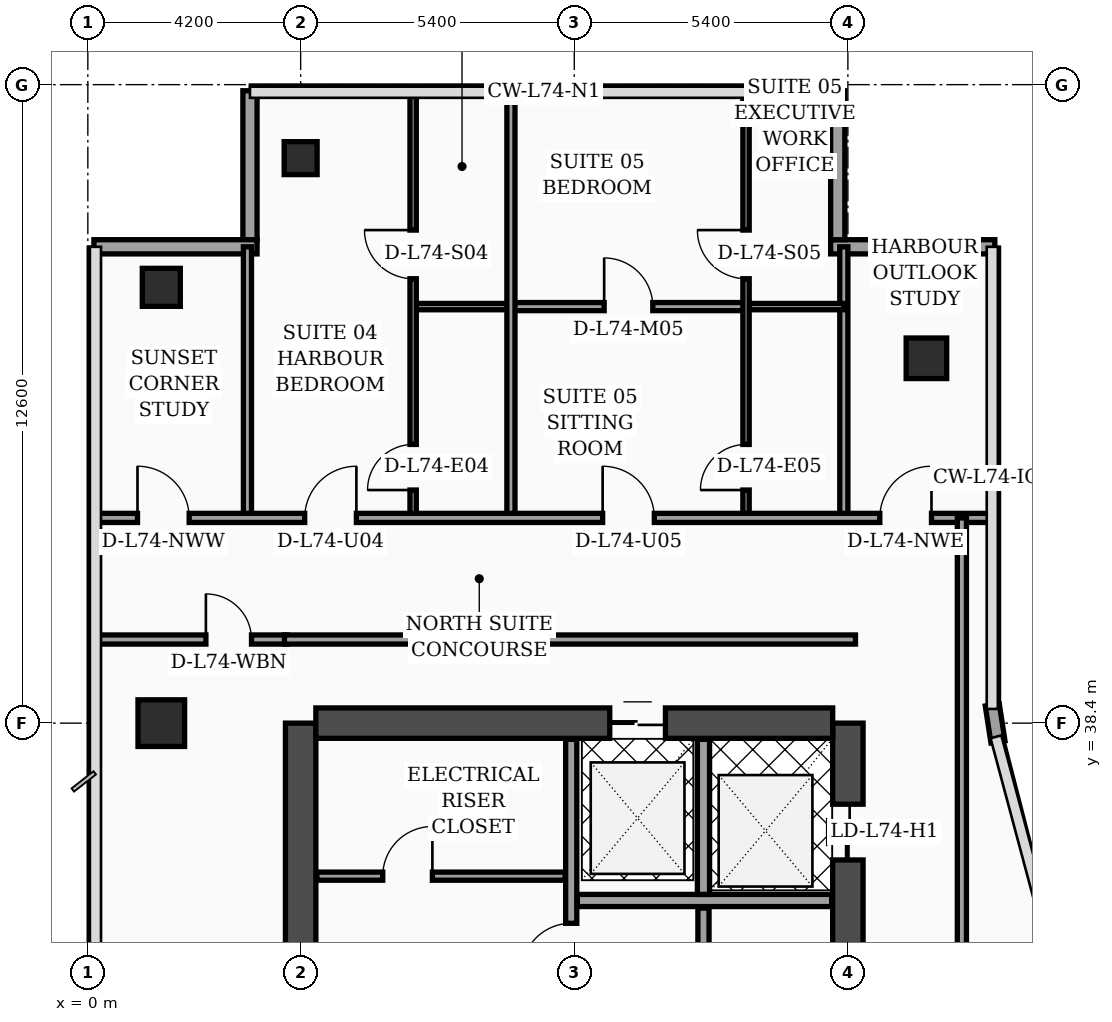
"""IFC4 building model, lengths in metres.
Left out: names, types, materials, properties, quantities, classifications, styles, units other than length and angle.
Written with IfcOpenShell. Run it as: python <this file> out.ifc"""

import sys

from ifc_helpers import new_model, si_unit, direction, frame, frame_2d, origin, origin_2d, place, context, subcontext, project, spatial, rectangle, hollow_rectangle, extrude, element, fill, save


model = new_model("IFC4")
c1 = context("Model", 3, precision=1e-05, world=origin(), true_north=direction((0.0, 1.0)))
c2 = subcontext(c1, "Body", "Model", "MODEL_VIEW")
j1 = project(units=[si_unit("LENGTHUNIT", "METRE"), si_unit("PLANEANGLEUNIT", "RADIAN")], contexts=[c1])
p1 = place(None, origin())
s1 = spatial("IfcSite", under=j1, at=p1, CompositionType="ELEMENT")
p2 = place(p1, origin())
s2 = spatial("IfcBuilding", under=s1, at=p2, CompositionType="ELEMENT")
p3 = place(p2, frame((0.0, 0.0, 298.7)))
s3 = spatial("IfcBuildingStorey", under=s2, at=p3, CompositionType="ELEMENT", Elevation=298.7)
p4 = place(p3, frame((4.2, 16.8, 0.0), z_axis=(0.0, 0.0, 1.0), x_axis=(0.0, 1.0, 0.0)))
e1 = element("IfcWall", 1, at=p4, inside=s3, PredefinedType="SHEAR", context=c2, shape_type="SweptSolid", body=[
    extrude(rectangle(XDim=21.6, YDim=0.6, at=frame_2d((10.8, 0.0))), origin(), (0.0, 0.0, 1.0), 3.56),
])
p5 = place(p3, frame((15.0, 16.8, 0.0), z_axis=(0.0, 0.0, 1.0), x_axis=(0.0, 1.0, 0.0)))
e2 = element("IfcWall", 2, at=p5, inside=s3, PredefinedType="SHEAR", context=c2, shape_type="SweptSolid", body=[
    extrude(rectangle(XDim=21.6, YDim=0.6, at=frame_2d((10.8, 0.0))), origin(), (0.0, 0.0, 1.0), 3.56),
])
p6 = place(p5, frame((8.65, 0.0, 0.0)))
e3 = element("IfcOpeningElement", 3, at=p6, cuts=e2, PredefinedType="OPENING", context=c2, shape_type="SweptSolid", body=[
    extrude(rectangle(XDim=1.1, YDim=2.2, at=frame_2d((0.55, 1.1))), frame((0.0, 0.31, 0.0), z_axis=(0.0, -1.0, 0.0), x_axis=(1.0, 0.0, 0.0)), (0.0, 0.0, 1.0), 0.62),
])
p7 = place(p5, frame((18.9, 0.0, 0.0)))
e4 = element("IfcOpeningElement", 4, at=p7, cuts=e2, PredefinedType="OPENING", context=c2, shape_type="SweptSolid", body=[
    extrude(rectangle(XDim=1.1, YDim=2.2, at=frame_2d((0.55, 1.1))), frame((0.0, 0.31, 0.0), z_axis=(0.0, -1.0, 0.0), x_axis=(1.0, 0.0, 0.0)), (0.0, 0.0, 1.0), 0.62),
])
p8 = place(p3, frame((4.5, 38.4, 0.0), z_axis=(0.0, 0.0, 1.0), x_axis=(1.0, 0.0, 0.0)))
e5 = element("IfcWall", 5, at=p8, inside=s3, PredefinedType="SHEAR", context=c2, shape_type="SweptSolid", body=[
    extrude(rectangle(XDim=10.2, YDim=0.6, at=frame_2d((5.1, 0.0))), origin(), (0.0, 0.0, 1.0), 3.56),
])
p9 = place(p8, frame((5.8, 0.0, 0.0)))
e6 = element("IfcOpeningElement", 6, at=p9, cuts=e5, PredefinedType="OPENING", context=c2, shape_type="SweptSolid", body=[
    extrude(rectangle(XDim=1.1, YDim=2.2, at=frame_2d((0.55, 1.1))), frame((0.0, 0.31, 0.0), z_axis=(0.0, -1.0, 0.0), x_axis=(1.0, 0.0, 0.0)), (0.0, 0.0, 1.0), 0.62),
])
p10 = place(p3, frame((1.45, 38.4, 0.0), z_axis=(0.0, 0.0, 1.0), x_axis=(1.0, 0.0, 0.0)))
e7 = element("IfcColumn", 7, at=p10, inside=s3, PredefinedType="COLUMN", context=c2, shape_type="SweptSolid", body=[
    extrude(rectangle(XDim=0.92, YDim=0.92, at=origin_2d()), origin(), (0.0, 0.0, 1.0), 3.56),
])
p11 = place(p3, frame((1.45, 47.0, 0.0), z_axis=(0.0, 0.0, 1.0), x_axis=(1.0, 0.0, 0.0)))
e8 = element("IfcColumn", 8, at=p11, inside=s3, PredefinedType="COLUMN", context=c2, shape_type="SweptSolid", body=[
    extrude(hollow_rectangle(XDim=0.75, YDim=0.75, WallThickness=0.032, at=origin_2d()), origin(), (0.0, 0.0, 1.0), 3.56),
])
p12 = place(p3, frame((4.2, 49.55, 0.0), z_axis=(0.0, 0.0, 1.0), x_axis=(1.0, 0.0, 0.0)))
e9 = element("IfcColumn", 9, at=p12, inside=s3, PredefinedType="COLUMN", context=c2, shape_type="SweptSolid", body=[
    extrude(hollow_rectangle(XDim=0.65, YDim=0.65, WallThickness=0.028, at=origin_2d()), origin(), (0.0, 0.0, 1.0), 3.56),
])
p13 = place(p3, frame((16.55, 45.6, 0.0), z_axis=(0.0, 0.0, 1.0), x_axis=(1.0, 0.0, 0.0)))
e10 = element("IfcColumn", 10, at=p13, inside=s3, PredefinedType="COLUMN", context=c2, shape_type="SweptSolid", body=[
    extrude(rectangle(XDim=0.8, YDim=0.8, at=origin_2d()), origin(), (0.0, 0.0, 1.0), 3.56),
])
p14 = place(p3, frame((17.962, 38.03, 0.0), z_axis=(0.0, 0.0, 1.0), x_axis=(-0.15141125477, 0.988470855377, 0.0)))
e11 = element("IfcWall", 11, at=p14, inside=s3, PredefinedType="SOLIDWALL", context=c2, shape_type="SweptSolid", body=[
    extrude(rectangle(XDim=0.739, YDim=0.28, at=frame_2d((0.369, 0.0))), origin(), (0.0, 0.0, 1.0), 3.56),
])
p15 = place(p3, frame((17.9, 47.8, 0.0), z_axis=(0.0, 0.0, 1.0), x_axis=(-1.0, 0.0, 0.0)))
e12 = element("IfcWall", 12, at=p15, inside=s3, PredefinedType="SOLIDWALL", context=c2, shape_type="SweptSolid", body=[
    extrude(rectangle(XDim=3.24, YDim=0.28, at=frame_2d((1.62, 0.0))), origin(), (0.0, 0.0, 1.0), 3.56),
])
p16 = place(p3, frame((14.8, 47.94, 0.0), z_axis=(0.0, 0.0, 1.0), x_axis=(0.0, 1.0, 0.0)))
e13 = element("IfcWall", 13, at=p16, inside=s3, PredefinedType="SOLIDWALL", context=c2, shape_type="SweptSolid", body=[
    extrude(rectangle(XDim=2.94, YDim=0.28, at=frame_2d((1.47, 0.0))), origin(), (0.0, 0.0, 1.0), 3.56),
])
p17 = place(p3, frame((3.2, 50.88, 0.0), z_axis=(0.0, 0.0, 1.0), x_axis=(0.0, -1.0, 0.0)))
e14 = element("IfcWall", 14, at=p17, inside=s3, PredefinedType="SOLIDWALL", context=c2, shape_type="SweptSolid", body=[
    extrude(rectangle(XDim=2.94, YDim=0.28, at=frame_2d((1.47, 0.0))), origin(), (0.0, 0.0, 1.0), 3.09),
])
p18 = place(p3, frame((3.34, 47.8, 0.0), z_axis=(0.0, 0.0, 1.0), x_axis=(-1.0, 0.0, 0.0)))
e15 = element("IfcWall", 15, at=p18, inside=s3, PredefinedType="SOLIDWALL", context=c2, shape_type="SweptSolid", body=[
    extrude(rectangle(XDim=3.22, YDim=0.28, at=frame_2d((1.61, 0.0))), origin(), (0.0, 0.0, 1.0), 3.09),
])
p19 = place(p3, frame((4.52, 35.38, 0.0), z_axis=(0.0, 0.0, 1.0), x_axis=(1.0, 0.0, 0.0)))
e16 = element("IfcWall", 16, at=p19, inside=s3, PredefinedType="PARTITIONING", context=c2, shape_type="SweptSolid", body=[
    extrude(rectangle(XDim=4.9, YDim=0.16, at=frame_2d((2.45, 0.0))), origin(), (0.0, 0.0, 1.0), 3.56),
])
p20 = place(p19, frame((1.3, 0.0, 0.0)))
e17 = element("IfcOpeningElement", 17, at=p20, cuts=e16, PredefinedType="OPENING", context=c2, shape_type="SweptSolid", body=[
    extrude(rectangle(XDim=0.98, YDim=2.15, at=frame_2d((0.49, 1.075))), frame((0.0, 0.09, 0.0), z_axis=(0.0, -1.0, 0.0), x_axis=(1.0, 0.0, 0.0)), (0.0, 0.0, 1.0), 0.18),
])
p21 = place(p3, frame((9.54, 32.92, 0.0), z_axis=(0.0, 0.0, 1.0), x_axis=(0.0, 1.0, 0.0)))
e18 = element("IfcWall", 18, at=p21, inside=s3, PredefinedType="SOLIDWALL", context=c2, shape_type="SweptSolid", body=[
    extrude(rectangle(XDim=5.16, YDim=0.22, at=frame_2d((2.58, 0.0))), origin(), (0.0, 0.0, 1.0), 3.56),
])
p22 = place(p21, frame((0.55, 0.0, 0.0)))
e19 = element("IfcOpeningElement", 19, at=p22, cuts=e18, PredefinedType="OPENING", context=c2, shape_type="SweptSolid", body=[
    extrude(rectangle(XDim=0.98, YDim=2.15, at=frame_2d((0.49, 1.075))), frame((0.0, 0.12, 0.0), z_axis=(0.0, -1.0, 0.0), x_axis=(1.0, 0.0, 0.0)), (0.0, 0.0, 1.0), 0.24),
])
p23 = place(p3, frame((12.15, 27.0, 0.0), z_axis=(0.0, 0.0, 1.0), x_axis=(0.0, 1.0, 0.0)))
e20 = element("IfcWall", 20, at=p23, inside=s3, PredefinedType="SOLIDWALL", context=c2, shape_type="SweptSolid", body=[
    extrude(rectangle(XDim=7.75, YDim=0.22, at=frame_2d((3.875, 0.0))), origin(), (0.0, 0.0, 1.0), 3.56),
])
p24 = place(p23, frame((0.8, 0.0, 0.0)))
e21 = element("IfcOpeningElement", 21, at=p24, cuts=e20, PredefinedType="OPENING", context=c2, shape_type="SweptSolid", body=[
    extrude(rectangle(XDim=0.98, YDim=2.15, at=frame_2d((0.49, 1.075))), frame((0.0, 0.12, 0.0), z_axis=(0.0, -1.0, 0.0), x_axis=(1.0, 0.0, 0.0)), (0.0, 0.0, 1.0), 0.24),
])
p25 = place(p3, frame((9.66, 34.9, 0.0), z_axis=(0.0, 0.0, 1.0), x_axis=(1.0, 0.0, 0.0)))
e22 = element("IfcWall", 22, at=p25, inside=s3, PredefinedType="SOLIDWALL", context=c2, shape_type="SweptSolid", body=[
    extrude(rectangle(XDim=5.02, YDim=0.24, at=frame_2d((2.51, 0.0))), origin(), (0.0, 0.0, 1.0), 3.56),
])
p26 = place(p3, frame((12.15, 35.02, 0.0), z_axis=(0.0, 0.0, 1.0), x_axis=(0.0, 1.0, 0.0)))
e23 = element("IfcWall", 23, at=p26, inside=s3, PredefinedType="SOLIDWALL", context=c2, shape_type="SweptSolid", body=[
    extrude(rectangle(XDim=3.06, YDim=0.24, at=frame_2d((1.53, 0.0))), origin(), (0.0, 0.0, 1.0), 3.56),
])
p27 = place(p3, frame((0.08, 40.05, 0.0), z_axis=(0.0, 0.0, 1.0), x_axis=(1.0, 0.0, 0.0)))
e24 = element("IfcWall", 24, at=p27, inside=s3, PredefinedType="PARTITIONING", context=c2, shape_type="SweptSolid", body=[
    extrude(rectangle(XDim=3.85, YDim=0.18, at=frame_2d((1.925, 0.0))), origin(), (0.0, 0.0, 1.0), 2.99),
])
p28 = place(p27, frame((2.25, 0.0, 0.0)))
e25 = element("IfcOpeningElement", 25, at=p28, cuts=e24, PredefinedType="OPENING", context=c2, shape_type="SweptSolid", body=[
    extrude(rectangle(XDim=0.9, YDim=2.15, at=frame_2d((0.45, 1.075))), frame((0.0, 0.1, 0.0), z_axis=(0.0, -1.0, 0.0), x_axis=(1.0, 0.0, 0.0)), (0.0, 0.0, 1.0), 0.2),
])
p29 = place(p3, frame((3.15, 42.45, 0.0), z_axis=(0.0, 0.0, 1.0), x_axis=(0.0, 1.0, 0.0)))
e26 = element("IfcWall", 26, at=p29, inside=s3, PredefinedType="PARTITIONING", context=c2, shape_type="SweptSolid", body=[
    extrude(rectangle(XDim=5.35, YDim=0.16, at=frame_2d((2.675, 0.0))), origin(), (0.0, 0.0, 1.0), 3.14),
])
p30 = place(p3, frame((14.92, 42.45, 0.0), z_axis=(0.0, 0.0, 1.0), x_axis=(0.0, 1.0, 0.0)))
e27 = element("IfcWall", 27, at=p30, inside=s3, PredefinedType="PARTITIONING", context=c2, shape_type="SweptSolid", body=[
    extrude(rectangle(XDim=5.35, YDim=0.16, at=frame_2d((2.675, 0.0))), origin(), (0.0, 0.0, 1.0), 3.09),
])
p31 = place(p3, frame((6.42, 46.62, 0.0), z_axis=(0.0, 0.0, 1.0), x_axis=(1.0, 0.0, 0.0)))
e28 = element("IfcWall", 28, at=p31, inside=s3, PredefinedType="PARTITIONING", context=c2, shape_type="SweptSolid", body=[
    extrude(rectangle(XDim=1.93, YDim=0.125, at=frame_2d((0.965, 0.0))), origin(), (0.0, 0.0, 1.0), 3.56),
])
p32 = place(p3, frame((6.42, 42.45, 0.0), z_axis=(0.0, 0.0, 1.0), x_axis=(0.0, 1.0, 0.0)))
e29 = element("IfcWall", 29, at=p32, inside=s3, PredefinedType="PARTITIONING", context=c2, shape_type="SweptSolid", body=[
    extrude(rectangle(XDim=8.49, YDim=0.125, at=frame_2d((4.245, 0.0))), origin(), (0.0, 0.0, 1.0), 3.09),
])
p33 = place(p32, frame((0.55, 0.0, 0.0)))
e30 = element("IfcOpeningElement", 30, at=p33, cuts=e29, PredefinedType="OPENING", context=c2, shape_type="SweptSolid", body=[
    extrude(rectangle(XDim=0.9, YDim=2.15, at=frame_2d((0.45, 1.075))), frame((0.0, 0.073, 0.0), z_axis=(0.0, -1.0, 0.0), x_axis=(1.0, 0.0, 0.0)), (0.0, 0.0, 1.0), 0.145),
])
p34 = place(p32, frame((4.72, 0.0, 0.0)))
e31 = element("IfcOpeningElement", 31, at=p34, cuts=e29, PredefinedType="OPENING", context=c2, shape_type="SweptSolid", body=[
    extrude(rectangle(XDim=0.96, YDim=2.2, at=frame_2d((0.48, 1.1))), frame((0.0, 0.073, 0.0), z_axis=(0.0, -1.0, 0.0), x_axis=(1.0, 0.0, 0.0)), (0.0, 0.0, 1.0), 0.145),
])
p35 = place(p3, frame((12.99, 46.62, 0.0), z_axis=(0.0, 0.0, 1.0), x_axis=(1.0, 0.0, 0.0)))
e32 = element("IfcWall", 32, at=p35, inside=s3, PredefinedType="PARTITIONING", context=c2, shape_type="SweptSolid", body=[
    extrude(rectangle(XDim=1.93, YDim=0.125, at=frame_2d((0.965, 0.0))), origin(), (0.0, 0.0, 1.0), 3.09),
])
p36 = place(p3, frame((8.35, 46.62, 0.0), z_axis=(0.0, 0.0, 1.0), x_axis=(1.0, 0.0, 0.0)))
e33 = element("IfcWall", 33, at=p36, inside=s3, PredefinedType="PARTITIONING", context=c2, shape_type="SweptSolid", body=[
    extrude(rectangle(XDim=4.64, YDim=0.16, at=frame_2d((2.32, 0.0))), origin(), (0.0, 0.0, 1.0), 3.09),
])
p37 = place(p36, frame((1.84, 0.0, 0.0)))
e34 = element("IfcOpeningElement", 34, at=p37, cuts=e33, PredefinedType="OPENING", context=c2, shape_type="SweptSolid", body=[
    extrude(rectangle(XDim=0.96, YDim=2.2, at=frame_2d((0.48, 1.1))), frame((0.0, 0.09, 0.0), z_axis=(0.0, -1.0, 0.0), x_axis=(1.0, 0.0, 0.0)), (0.0, 0.0, 1.0), 0.18),
])
p38 = place(p3, frame((12.99, 42.45, 0.0), z_axis=(0.0, 0.0, 1.0), x_axis=(0.0, 1.0, 0.0)))
e35 = element("IfcWall", 35, at=p38, inside=s3, PredefinedType="PARTITIONING", context=c2, shape_type="SweptSolid", body=[
    extrude(rectangle(XDim=8.49, YDim=0.125, at=frame_2d((4.245, 0.0))), origin(), (0.0, 0.0, 1.0), 3.09),
])
p39 = place(p38, frame((0.55, 0.0, 0.0)))
e36 = element("IfcOpeningElement", 36, at=p39, cuts=e35, PredefinedType="OPENING", context=c2, shape_type="SweptSolid", body=[
    extrude(rectangle(XDim=0.9, YDim=2.15, at=frame_2d((0.45, 1.075))), frame((0.0, 0.073, 0.0), z_axis=(0.0, -1.0, 0.0), x_axis=(1.0, 0.0, 0.0)), (0.0, 0.0, 1.0), 0.145),
])
p40 = place(p38, frame((4.72, 0.0, 0.0)))
e37 = element("IfcOpeningElement", 37, at=p40, cuts=e35, PredefinedType="OPENING", context=c2, shape_type="SweptSolid", body=[
    extrude(rectangle(XDim=0.96, YDim=2.2, at=frame_2d((0.48, 1.1))), frame((0.0, 0.073, 0.0), z_axis=(0.0, -1.0, 0.0), x_axis=(1.0, 0.0, 0.0)), (0.0, 0.0, 1.0), 0.145),
])
p41 = place(p3, frame((8.35, 42.45, 0.0), z_axis=(0.0, 0.0, 1.0), x_axis=(0.0, 1.0, 0.0)))
e38 = element("IfcWall", 38, at=p41, inside=s3, PredefinedType="PARTITIONING", context=c2, shape_type="SweptSolid", body=[
    extrude(rectangle(XDim=8.49, YDim=0.16, at=frame_2d((4.245, 0.0))), origin(), (0.0, 0.0, 1.0), 3.09),
])
p42 = place(p3, frame((0.08, 42.45, 0.0), z_axis=(0.0, 0.0, 1.0), x_axis=(1.0, 0.0, 0.0)))
e39 = element("IfcWall", 39, at=p42, inside=s3, PredefinedType="PARTITIONING", context=c2, shape_type="SweptSolid", body=[
    extrude(rectangle(XDim=17.77, YDim=0.18, at=frame_2d((8.885, 0.0))), origin(), (0.0, 0.0, 1.0), 2.99),
])
p43 = place(p42, frame((0.9, 0.0, 0.0)))
e40 = element("IfcOpeningElement", 40, at=p43, cuts=e39, PredefinedType="OPENING", context=c2, shape_type="SweptSolid", body=[
    extrude(rectangle(XDim=1.02, YDim=2.2, at=frame_2d((0.51, 1.1))), frame((0.0, 0.1, 0.0), z_axis=(0.0, -1.0, 0.0), x_axis=(1.0, 0.0, 0.0)), (0.0, 0.0, 1.0), 0.2),
])
p44 = place(p42, frame((4.2, 0.0, 0.0)))
e41 = element("IfcOpeningElement", 41, at=p44, cuts=e39, PredefinedType="OPENING", context=c2, shape_type="SweptSolid", body=[
    extrude(rectangle(XDim=1.02, YDim=2.2, at=frame_2d((0.51, 1.1))), frame((0.0, 0.1, 0.0), z_axis=(0.0, -1.0, 0.0), x_axis=(1.0, 0.0, 0.0)), (0.0, 0.0, 1.0), 0.2),
])
p45 = place(p42, frame((10.08, 0.0, 0.0)))
e42 = element("IfcOpeningElement", 42, at=p45, cuts=e39, PredefinedType="OPENING", context=c2, shape_type="SweptSolid", body=[
    extrude(rectangle(XDim=1.02, YDim=2.2, at=frame_2d((0.51, 1.1))), frame((0.0, 0.1, 0.0), z_axis=(0.0, -1.0, 0.0), x_axis=(1.0, 0.0, 0.0)), (0.0, 0.0, 1.0), 0.2),
])
p46 = place(p42, frame((15.55, 0.0, 0.0)))
e43 = element("IfcOpeningElement", 43, at=p46, cuts=e39, PredefinedType="OPENING", context=c2, shape_type="SweptSolid", body=[
    extrude(rectangle(XDim=1.02, YDim=2.2, at=frame_2d((0.51, 1.1))), frame((0.0, 0.1, 0.0), z_axis=(0.0, -1.0, 0.0), x_axis=(1.0, 0.0, 0.0)), (0.0, 0.0, 1.0), 0.2),
])
p47 = place(p3, frame((17.25, 24.3, 0.0), z_axis=(0.0, 0.0, 1.0), x_axis=(0.0, 1.0, 0.0)))
e44 = element("IfcWall", 44, at=p47, inside=s3, PredefinedType="PARTITIONING", context=c2, shape_type="SweptSolid", body=[
    extrude(rectangle(XDim=18.15, YDim=0.18, at=frame_2d((9.075, 0.0))), origin(), (0.0, 0.0, 1.0), 2.99),
])
p48 = place(p47, frame((3.2, 0.0, 0.0)))
e45 = element("IfcOpeningElement", 45, at=p48, cuts=e44, PredefinedType="OPENING", context=c2, shape_type="SweptSolid", body=[
    extrude(rectangle(XDim=1.02, YDim=2.2, at=frame_2d((0.51, 1.1))), frame((0.0, 0.1, 0.0), z_axis=(0.0, -1.0, 0.0), x_axis=(1.0, 0.0, 0.0)), (0.0, 0.0, 1.0), 0.2),
])
p49 = place(p3, frame((3.88, 40.05, 0.0), z_axis=(0.0, 0.0, 1.0), x_axis=(1.0, 0.0, 0.0)))
e46 = element("IfcWall", 46, at=p49, inside=s3, PredefinedType="PARTITIONING", context=c2, shape_type="SweptSolid", body=[
    extrude(rectangle(XDim=11.27, YDim=0.18, at=frame_2d((5.635, 0.0))), origin(), (0.0, 0.0, 1.0), 2.99),
])
p50 = place(p20, origin())
e47 = element("IfcDoor", 47, at=p50, inside=s3, OperationType="SINGLE_SWING_RIGHT", PredefinedType="DOOR", context=c2, shape_type="SweptSolid", body=[
    extrude(rectangle(XDim=0.98, YDim=2.15, at=frame_2d((0.49, 1.075))), frame((0.0, 0.025, 0.0), z_axis=(0.0, -1.0, 0.0), x_axis=(1.0, 0.0, 0.0)), (0.0, 0.0, 1.0), 0.05),
])
fill(e17, e47)
p51 = place(p22, origin())
e48 = element("IfcDoor", 48, at=p51, inside=s3, OperationType="SINGLE_SWING_LEFT", PredefinedType="DOOR", context=c2, shape_type="SweptSolid", body=[
    extrude(rectangle(XDim=0.98, YDim=2.15, at=frame_2d((0.49, 1.075))), frame((0.0, 0.025, 0.0), z_axis=(0.0, -1.0, 0.0), x_axis=(1.0, 0.0, 0.0)), (0.0, 0.0, 1.0), 0.05),
])
fill(e19, e48)
p52 = place(p28, origin())
e49 = element("IfcDoor", 49, at=p52, inside=s3, OperationType="SINGLE_SWING_LEFT", PredefinedType="DOOR", context=c2, shape_type="SweptSolid", body=[
    extrude(rectangle(XDim=0.9, YDim=2.15, at=frame_2d((0.45, 1.075))), frame((0.0, 0.025, 0.0), z_axis=(0.0, -1.0, 0.0), x_axis=(1.0, 0.0, 0.0)), (0.0, 0.0, 1.0), 0.05),
])
fill(e25, e49)
p53 = place(p33, origin())
e50 = element("IfcDoor", 50, at=p53, inside=s3, OperationType="SINGLE_SWING_LEFT", PredefinedType="DOOR", context=c2, shape_type="SweptSolid", body=[
    extrude(rectangle(XDim=0.9, YDim=2.15, at=frame_2d((0.45, 1.075))), frame((0.0, 0.025, 0.0), z_axis=(0.0, -1.0, 0.0), x_axis=(1.0, 0.0, 0.0)), (0.0, 0.0, 1.0), 0.05),
])
fill(e30, e50)
p54 = place(p34, origin())
e51 = element("IfcDoor", 51, at=p54, inside=s3, OperationType="SINGLE_SWING_RIGHT", PredefinedType="DOOR", context=c2, shape_type="SweptSolid", body=[
    extrude(rectangle(XDim=0.96, YDim=2.2, at=frame_2d((0.48, 1.1))), frame((0.0, 0.025, 0.0), z_axis=(0.0, -1.0, 0.0), x_axis=(1.0, 0.0, 0.0)), (0.0, 0.0, 1.0), 0.05),
])
fill(e31, e51)
p55 = place(p37, origin())
e52 = element("IfcDoor", 52, at=p55, inside=s3, OperationType="SINGLE_SWING_LEFT", PredefinedType="DOOR", context=c2, shape_type="SweptSolid", body=[
    extrude(rectangle(XDim=0.96, YDim=2.2, at=frame_2d((0.48, 1.1))), frame((0.0, 0.025, 0.0), z_axis=(0.0, -1.0, 0.0), x_axis=(1.0, 0.0, 0.0)), (0.0, 0.0, 1.0), 0.05),
])
fill(e34, e52)
p56 = place(p39, origin())
e53 = element("IfcDoor", 53, at=p56, inside=s3, OperationType="SINGLE_SWING_LEFT", PredefinedType="DOOR", context=c2, shape_type="SweptSolid", body=[
    extrude(rectangle(XDim=0.9, YDim=2.15, at=frame_2d((0.45, 1.075))), frame((0.0, 0.025, 0.0), z_axis=(0.0, -1.0, 0.0), x_axis=(1.0, 0.0, 0.0)), (0.0, 0.0, 1.0), 0.05),
])
fill(e36, e53)
p57 = place(p40, origin())
e54 = element("IfcDoor", 54, at=p57, inside=s3, OperationType="SINGLE_SWING_RIGHT", PredefinedType="DOOR", context=c2, shape_type="SweptSolid", body=[
    extrude(rectangle(XDim=0.96, YDim=2.2, at=frame_2d((0.48, 1.1))), frame((0.0, 0.025, 0.0), z_axis=(0.0, -1.0, 0.0), x_axis=(1.0, 0.0, 0.0)), (0.0, 0.0, 1.0), 0.05),
])
fill(e37, e54)
p58 = place(p43, origin())
e55 = element("IfcDoor", 55, at=p58, inside=s3, OperationType="SINGLE_SWING_LEFT", PredefinedType="DOOR", context=c2, shape_type="SweptSolid", body=[
    extrude(rectangle(XDim=1.02, YDim=2.2, at=frame_2d((0.51, 1.1))), frame((0.0, 0.025, 0.0), z_axis=(0.0, -1.0, 0.0), x_axis=(1.0, 0.0, 0.0)), (0.0, 0.0, 1.0), 0.05),
])
fill(e40, e55)
p59 = place(p44, origin())
e56 = element("IfcDoor", 56, at=p59, inside=s3, OperationType="SINGLE_SWING_RIGHT", PredefinedType="DOOR", context=c2, shape_type="SweptSolid", body=[
    extrude(rectangle(XDim=1.02, YDim=2.2, at=frame_2d((0.51, 1.1))), frame((0.0, 0.025, 0.0), z_axis=(0.0, -1.0, 0.0), x_axis=(1.0, 0.0, 0.0)), (0.0, 0.0, 1.0), 0.05),
])
fill(e41, e56)
p60 = place(p45, origin())
e57 = element("IfcDoor", 57, at=p60, inside=s3, OperationType="SINGLE_SWING_LEFT", PredefinedType="DOOR", context=c2, shape_type="SweptSolid", body=[
    extrude(rectangle(XDim=1.02, YDim=2.2, at=frame_2d((0.51, 1.1))), frame((0.0, 0.025, 0.0), z_axis=(0.0, -1.0, 0.0), x_axis=(1.0, 0.0, 0.0)), (0.0, 0.0, 1.0), 0.05),
])
fill(e42, e57)
p61 = place(p46, origin())
e58 = element("IfcDoor", 58, at=p61, inside=s3, OperationType="SINGLE_SWING_RIGHT", PredefinedType="DOOR", context=c2, shape_type="SweptSolid", body=[
    extrude(rectangle(XDim=1.02, YDim=2.2, at=frame_2d((0.51, 1.1))), frame((0.0, 0.025, 0.0), z_axis=(0.0, -1.0, 0.0), x_axis=(1.0, 0.0, 0.0)), (0.0, 0.0, 1.0), 0.05),
])
fill(e43, e58)
p62 = place(p7, origin())
e59 = element("IfcDoor", 59, at=p62, inside=s3, OperationType="DOUBLE_DOOR_SLIDING", PredefinedType="DOOR", context=c2, shape_type="SweptSolid", body=[
    extrude(rectangle(XDim=1.1, YDim=2.2, at=frame_2d((0.55, 1.1))), frame((0.0, 0.025, 0.0), z_axis=(0.0, -1.0, 0.0), x_axis=(1.0, 0.0, 0.0)), (0.0, 0.0, 1.0), 0.05),
])
fill(e4, e59)
p63 = place(p9, origin())
e60 = element("IfcDoor", 60, at=p63, inside=s3, OperationType="DOUBLE_DOOR_SLIDING", PredefinedType="DOOR", context=c2, shape_type="SweptSolid", body=[
    extrude(rectangle(XDim=1.1, YDim=2.2, at=frame_2d((0.55, 1.1))), frame((0.0, 0.025, 0.0), z_axis=(0.0, -1.0, 0.0), x_axis=(1.0, 0.0, 0.0)), (0.0, 0.0, 1.0), 0.05),
])
fill(e6, e60)
save(model, sys.argv[1])
